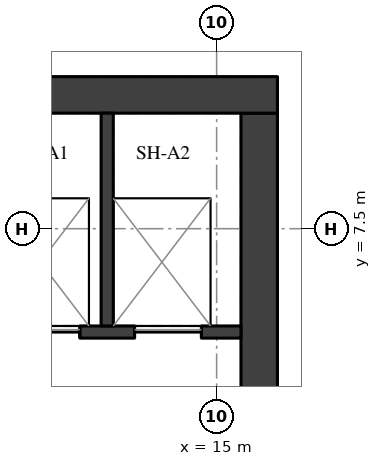
"""IFC4 building model, lengths in metres.
Left out: names, types, materials, properties, quantities, classifications, styles, units other than length and angle.
Written with IfcOpenShell. Run it as: python <this file> out.ifc"""

import sys

from ifc_helpers import new_model, si_unit, direction, frame, frame_2d, origin, place, context, subcontext, project, spatial, rectangle, extrude, element, fill, save


model = new_model("IFC4")
c1 = context("Model", 3, precision=1e-05, world=origin(), true_north=direction((0.0, 1.0)))
c2 = subcontext(c1, "Body", "Model", "MODEL_VIEW")
j1 = project(units=[si_unit("LENGTHUNIT", "METRE"), si_unit("PLANEANGLEUNIT", "RADIAN")], contexts=[c1])
p1 = place(None, origin())
s1 = spatial("IfcSite", under=j1, at=p1, CompositionType="ELEMENT")
p2 = place(p1, origin())
s2 = spatial("IfcBuilding", under=s1, at=p2, CompositionType="ELEMENT")
p3 = place(p2, frame((0.0, 0.0, 259.7)))
s3 = spatial("IfcBuildingStorey", under=s2, at=p3, CompositionType="ELEMENT", Elevation=259.7)
p4 = place(p3, frame((15.7, -9.4, 0.0), z_axis=(0.0, 0.0, 1.0), x_axis=(0.0, 1.0, 0.0)))
e1 = element("IfcWall", 1, at=p4, inside=s3, PredefinedType="SHEAR", context=c2, shape_type="SweptSolid", body=[
    extrude(rectangle(XDim=18.8, YDim=0.6, at=frame_2d((9.4, 0.0))), origin(), (0.0, 0.0, 1.0), 4.15),
])
p5 = place(p3, frame((4.0, 9.7, 0.0), z_axis=(0.0, 0.0, 1.0), x_axis=(1.0, 0.0, 0.0)))
e2 = element("IfcWall", 2, at=p5, inside=s3, PredefinedType="SHEAR", context=c2, shape_type="SweptSolid", body=[
    extrude(rectangle(XDim=12.0, YDim=0.6, at=frame_2d((6.0, 0.0))), origin(), (0.0, 0.0, 1.0), 4.15),
])
p6 = place(p3, frame((4.6, 5.8, 0.0), z_axis=(0.0, 0.0, 1.0), x_axis=(1.0, 0.0, 0.0)))
e3 = element("IfcWall", 3, at=p6, inside=s3, PredefinedType="SHEAR", context=c2, shape_type="SweptSolid", body=[
    extrude(rectangle(XDim=10.8, YDim=0.2, at=frame_2d((5.4, 0.0))), origin(), (0.0, 0.0, 1.0), 4.15),
])
p7 = place(p6, frame((7.05, 0.0, 0.0)))
e4 = element("IfcOpeningElement", 4, at=p7, cuts=e3, PredefinedType="OPENING", context=c2, shape_type="SweptSolid", body=[
    extrude(rectangle(XDim=1.1, YDim=2.1, at=frame_2d((0.55, 1.05))), frame((0.0, 0.11, 0.0), z_axis=(0.0, -1.0, 0.0), x_axis=(1.0, 0.0, 0.0)), (0.0, 0.0, 1.0), 0.22),
])
p8 = place(p6, frame((9.05, 0.0, 0.0)))
e5 = element("IfcOpeningElement", 5, at=p8, cuts=e3, PredefinedType="OPENING", context=c2, shape_type="SweptSolid", body=[
    extrude(rectangle(XDim=1.1, YDim=2.1, at=frame_2d((0.55, 1.05))), frame((0.0, 0.11, 0.0), z_axis=(0.0, -1.0, 0.0), x_axis=(1.0, 0.0, 0.0)), (0.0, 0.0, 1.0), 0.22),
])
p9 = place(p3, frame((13.2, 5.9, 0.0), z_axis=(0.0, 0.0, 1.0), x_axis=(0.0, 1.0, 0.0)))
e6 = element("IfcWall", 6, at=p9, inside=s3, PredefinedType="SHEAR", context=c2, shape_type="SweptSolid", body=[
    extrude(rectangle(XDim=3.5, YDim=0.2, at=frame_2d((1.75, 0.0))), origin(), (0.0, 0.0, 1.0), 4.15),
])
p10 = place(p7, origin())
e7 = element("IfcDoor", 7, at=p10, inside=s3, OperationType="DOUBLE_DOOR_SLIDING", PredefinedType="DOOR", context=c2, shape_type="SweptSolid", body=[
    extrude(rectangle(XDim=1.1, YDim=2.1, at=frame_2d((0.55, 1.05))), frame((0.0, 0.025, 0.0), z_axis=(0.0, -1.0, 0.0), x_axis=(1.0, 0.0, 0.0)), (0.0, 0.0, 1.0), 0.05),
])
fill(e4, e7)
p11 = place(p8, origin())
e8 = element("IfcDoor", 8, at=p11, inside=s3, OperationType="DOUBLE_DOOR_SLIDING", PredefinedType="DOOR", context=c2, shape_type="SweptSolid", body=[
    extrude(rectangle(XDim=1.1, YDim=2.1, at=frame_2d((0.55, 1.05))), frame((0.0, 0.025, 0.0), z_axis=(0.0, -1.0, 0.0), x_axis=(1.0, 0.0, 0.0)), (0.0, 0.0, 1.0), 0.05),
])
fill(e5, e8)
save(model, sys.argv[1])
